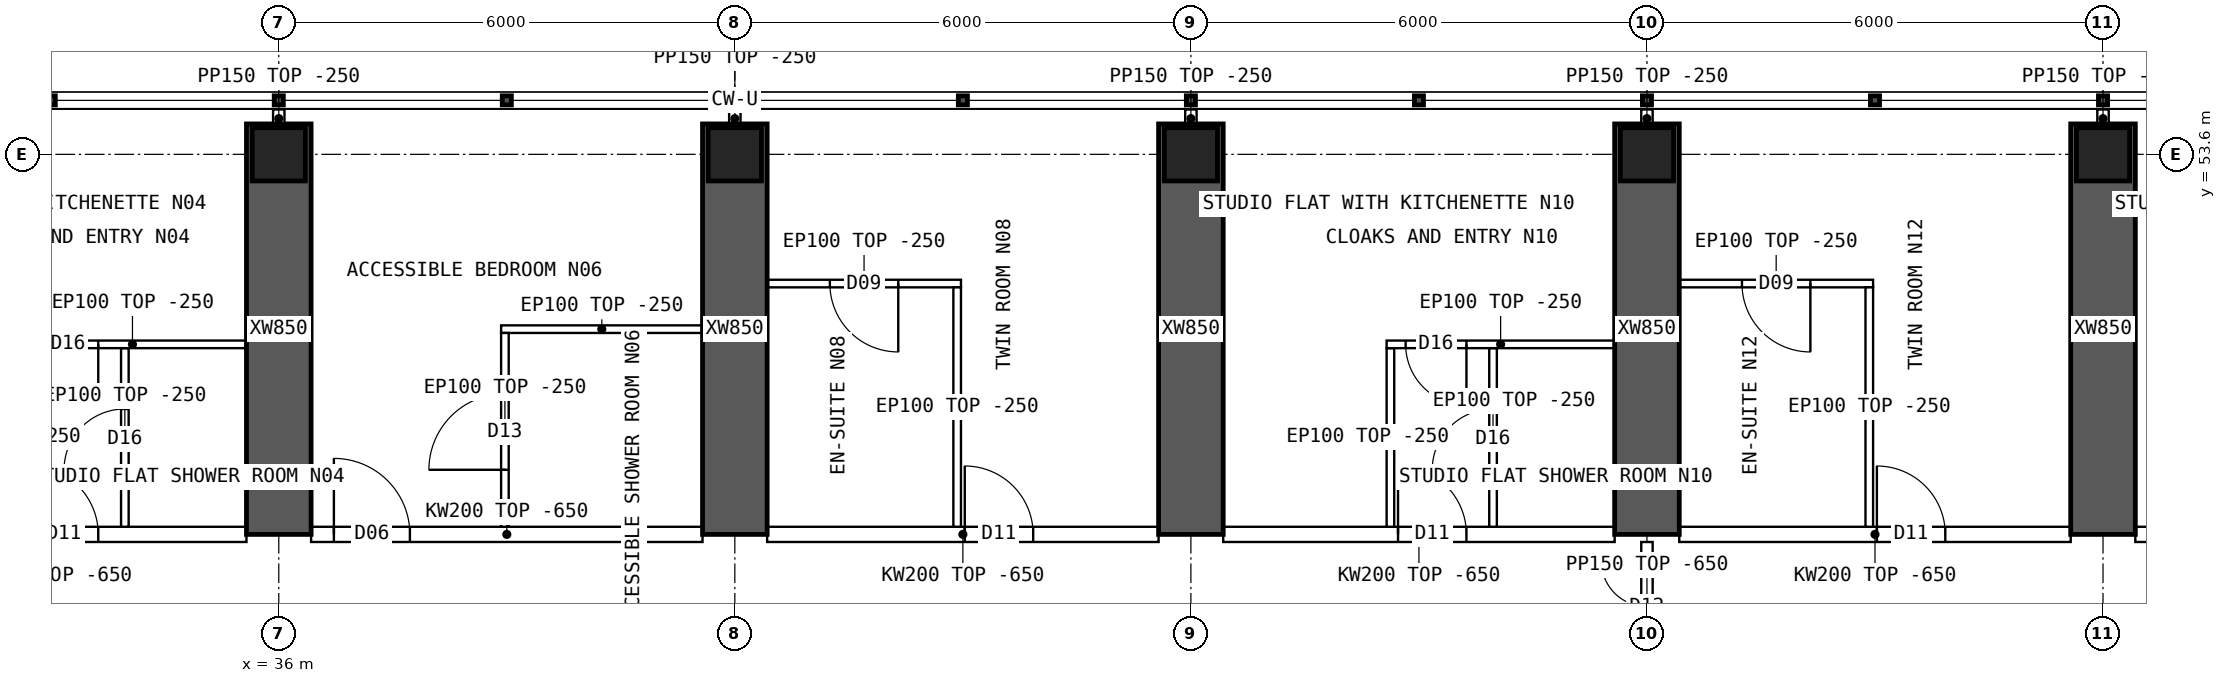
"""IFC4 building model, lengths in metres.
Left out: names, types, materials, properties, quantities, classifications, styles, units other than length and angle.
Written with IfcOpenShell. Run it as: python <this file> out.ifc"""

import sys

from ifc_helpers import new_model, si_unit, direction, frame, frame_2d, origin, origin_2d, place, context, subcontext, project, spatial, polyline, rectangle, hollow_rectangle, outline, extrude, element, fill, save


model = new_model("IFC4")
c1 = context("Model", 3, precision=1e-05, world=origin(), true_north=direction((0.0, 1.0)))
c2 = subcontext(c1, "Body", "Model", "MODEL_VIEW")
j1 = project(units=[si_unit("LENGTHUNIT", "METRE"), si_unit("PLANEANGLEUNIT", "RADIAN")], contexts=[c1])
p1 = place(None, origin())
s1 = spatial("IfcSite", under=j1, at=p1, CompositionType="ELEMENT")
p2 = place(p1, origin())
s2 = spatial("IfcBuilding", under=s1, at=p2, CompositionType="ELEMENT")
p3 = place(p2, frame((0.0, 0.0, 186.1)))
s3 = spatial("IfcBuildingStorey", under=s2, at=p3, CompositionType="ELEMENT", Elevation=186.1)
for number, where, z_axis, x_axis in (
    (1, (36.0, 53.6, 0.0), (0.0, 0.0, 1.0), (1.0, 0.0, 0.0)),
    (2, (42.0, 53.6, 0.0), (0.0, 0.0, 1.0), (1.0, 0.0, 0.0)),
    (3, (48.0, 53.6, 0.0), (0.0, 0.0, 1.0), (1.0, 0.0, 0.0)),
    (4, (54.0, 53.6, 0.0), (0.0, 0.0, 1.0), (1.0, 0.0, 0.0)),
    (5, (60.0, 53.6, 0.0), (0.0, 0.0, 1.0), (1.0, 0.0, 0.0)),
):
    element("IfcColumn", number, at=place(p3, frame(where, z_axis=z_axis, x_axis=x_axis)), inside=s3, PredefinedType="COLUMN", context=c2, shape_type="SweptSolid", body=[
        extrude(hollow_rectangle(XDim=0.7, YDim=0.7, WallThickness=0.07, at=origin_2d()), origin(), (0.0, 0.0, 1.0), 3.75),
    ])
for number, where, z_axis, x_axis in (
    (6, (36.0, 48.6, 0.0), (0.0, 0.0, 1.0), (0.0, 1.0, 0.0)),
    (7, (42.0, 48.6, 0.0), (0.0, 0.0, 1.0), (0.0, 1.0, 0.0)),
    (8, (48.0, 48.6, 0.0), (0.0, 0.0, 1.0), (0.0, 1.0, 0.0)),
    (9, (54.0, 48.6, 0.0), (0.0, 0.0, 1.0), (0.0, 1.0, 0.0)),
    (10, (60.0, 48.6, 0.0), (0.0, 0.0, 1.0), (0.0, 1.0, 0.0)),
):
    element("IfcWall", number, at=place(p3, frame(where, z_axis=z_axis, x_axis=x_axis)), inside=s3, PredefinedType="SHEAR", context=c2, shape_type="SweptSolid", body=[
        extrude(rectangle(XDim=5.4, YDim=0.85, at=frame_2d((2.7, 0.0))), origin(), (0.0, 0.0, 1.0), 3.75),
    ])
p4 = place(p3, frame((30.425, 48.6, 0.0), z_axis=(0.0, 0.0, 1.0), x_axis=(1.0, 0.0, 0.0)))
e11 = element("IfcWall", 11, at=p4, inside=s3, PredefinedType="SOLIDWALL", context=c2, shape_type="SweptSolid", body=[
    extrude(outline(polyline([(0.0, 0.0), (5.15, 0.0), (5.15, 3.1), (0.0, 3.1), (0.0, 0.0)])), frame((0.0, 0.1, 0.0), z_axis=(0.0, -1.0, 0.0), x_axis=(1.0, 0.0, 0.0)), (0.0, 0.0, 1.0), 0.2),
])
p5 = place(p4, frame((2.3, 0.0, 0.0)))
e12 = element("IfcOpeningElement", 12, at=p5, cuts=e11, PredefinedType="OPENING", context=c2, shape_type="SweptSolid", body=[
    extrude(rectangle(XDim=0.9, YDim=2.1, at=frame_2d((0.45, 1.05))), frame((0.0, 0.11, 0.0), z_axis=(0.0, -1.0, 0.0), x_axis=(1.0, 0.0, 0.0)), (0.0, 0.0, 1.0), 0.22),
])
p6 = place(p3, frame((36.425, 48.6, 0.0), z_axis=(0.0, 0.0, 1.0), x_axis=(1.0, 0.0, 0.0)))
e13 = element("IfcWall", 13, at=p6, inside=s3, PredefinedType="SOLIDWALL", context=c2, shape_type="SweptSolid", body=[
    extrude(outline(polyline([(0.0, 0.0), (5.15, 0.0), (5.15, 3.1), (0.0, 3.1), (0.0, 0.0)])), frame((0.0, 0.1, 0.0), z_axis=(0.0, -1.0, 0.0), x_axis=(1.0, 0.0, 0.0)), (0.0, 0.0, 1.0), 0.2),
])
p7 = place(p6, frame((0.3, 0.0, 0.0)))
e14 = element("IfcOpeningElement", 14, at=p7, cuts=e13, PredefinedType="OPENING", context=c2, shape_type="SweptSolid", body=[
    extrude(rectangle(XDim=1.0, YDim=2.1, at=frame_2d((0.5, 1.05))), frame((0.0, 0.11, 0.0), z_axis=(0.0, -1.0, 0.0), x_axis=(1.0, 0.0, 0.0)), (0.0, 0.0, 1.0), 0.22),
])
p8 = place(p3, frame((42.425, 48.6, 0.0), z_axis=(0.0, 0.0, 1.0), x_axis=(1.0, 0.0, 0.0)))
e15 = element("IfcWall", 15, at=p8, inside=s3, PredefinedType="SOLIDWALL", context=c2, shape_type="SweptSolid", body=[
    extrude(outline(polyline([(0.0, 0.0), (5.15, 0.0), (5.15, 3.1), (0.0, 3.1), (0.0, 0.0)])), frame((0.0, 0.1, 0.0), z_axis=(0.0, -1.0, 0.0), x_axis=(1.0, 0.0, 0.0)), (0.0, 0.0, 1.0), 0.2),
])
p9 = place(p8, frame((2.6, 0.0, 0.0)))
e16 = element("IfcOpeningElement", 16, at=p9, cuts=e15, PredefinedType="OPENING", context=c2, shape_type="SweptSolid", body=[
    extrude(rectangle(XDim=0.9, YDim=2.1, at=frame_2d((0.45, 1.05))), frame((0.0, 0.11, 0.0), z_axis=(0.0, -1.0, 0.0), x_axis=(1.0, 0.0, 0.0)), (0.0, 0.0, 1.0), 0.22),
])
p10 = place(p3, frame((48.425, 48.6, 0.0), z_axis=(0.0, 0.0, 1.0), x_axis=(1.0, 0.0, 0.0)))
e17 = element("IfcWall", 17, at=p10, inside=s3, PredefinedType="SOLIDWALL", context=c2, shape_type="SweptSolid", body=[
    extrude(outline(polyline([(0.0, 0.0), (5.15, 0.0), (5.15, 3.1), (0.0, 3.1), (0.0, 0.0)])), frame((0.0, 0.1, 0.0), z_axis=(0.0, -1.0, 0.0), x_axis=(1.0, 0.0, 0.0)), (0.0, 0.0, 1.0), 0.2),
])
p11 = place(p10, frame((2.3, 0.0, 0.0)))
e18 = element("IfcOpeningElement", 18, at=p11, cuts=e17, PredefinedType="OPENING", context=c2, shape_type="SweptSolid", body=[
    extrude(rectangle(XDim=0.9, YDim=2.1, at=frame_2d((0.45, 1.05))), frame((0.0, 0.11, 0.0), z_axis=(0.0, -1.0, 0.0), x_axis=(1.0, 0.0, 0.0)), (0.0, 0.0, 1.0), 0.22),
])
p12 = place(p3, frame((54.425, 48.6, 0.0), z_axis=(0.0, 0.0, 1.0), x_axis=(1.0, 0.0, 0.0)))
e19 = element("IfcWall", 19, at=p12, inside=s3, PredefinedType="SOLIDWALL", context=c2, shape_type="SweptSolid", body=[
    extrude(outline(polyline([(0.0, 0.0), (5.15, 0.0), (5.15, 3.1), (0.0, 3.1), (0.0, 0.0)])), frame((0.0, 0.1, 0.0), z_axis=(0.0, -1.0, 0.0), x_axis=(1.0, 0.0, 0.0)), (0.0, 0.0, 1.0), 0.2),
])
p13 = place(p12, frame((2.6, 0.0, 0.0)))
e20 = element("IfcOpeningElement", 20, at=p13, cuts=e19, PredefinedType="OPENING", context=c2, shape_type="SweptSolid", body=[
    extrude(rectangle(XDim=0.9, YDim=2.1, at=frame_2d((0.45, 1.05))), frame((0.0, 0.11, 0.0), z_axis=(0.0, -1.0, 0.0), x_axis=(1.0, 0.0, 0.0)), (0.0, 0.0, 1.0), 0.22),
])
p14 = place(p3, frame((60.425, 48.6, 0.0), z_axis=(0.0, 0.0, 1.0), x_axis=(1.0, 0.0, 0.0)))
e21 = element("IfcWall", 21, at=p14, inside=s3, PredefinedType="SOLIDWALL", context=c2, shape_type="SweptSolid", body=[
    extrude(outline(polyline([(0.0, 0.0), (5.15, 0.0), (5.15, 3.1), (0.0, 3.1), (0.0, 0.0)])), frame((0.0, 0.1, 0.0), z_axis=(0.0, -1.0, 0.0), x_axis=(1.0, 0.0, 0.0)), (0.0, 0.0, 1.0), 0.2),
])
p15 = place(p14, frame((2.3, 0.0, 0.0)))
e22 = element("IfcOpeningElement", 22, at=p15, cuts=e21, PredefinedType="OPENING", context=c2, shape_type="SweptSolid", body=[
    extrude(rectangle(XDim=0.9, YDim=2.1, at=frame_2d((0.45, 1.05))), frame((0.0, 0.11, 0.0), z_axis=(0.0, -1.0, 0.0), x_axis=(1.0, 0.0, 0.0)), (0.0, 0.0, 1.0), 0.22),
])
p16 = place(p3, frame((32.575, 51.1, 0.0), z_axis=(0.0, 0.0, 1.0), x_axis=(1.0, 0.0, 0.0)))
e23 = element("IfcWall", 23, at=p16, inside=s3, PredefinedType="PARTITIONING", context=c2, shape_type="SweptSolid", body=[
    extrude(rectangle(XDim=3.0, YDim=0.1, at=frame_2d((1.5, 0.0))), origin(), (0.0, 0.0, 1.0), 3.5),
])
p17 = place(p16, frame((0.25, 0.0, 0.0)))
e24 = element("IfcOpeningElement", 24, at=p17, cuts=e23, PredefinedType="OPENING", context=c2, shape_type="SweptSolid", body=[
    extrude(rectangle(XDim=0.8, YDim=2.1, at=frame_2d((0.4, 1.05))), frame((0.0, 0.06, 0.0), z_axis=(0.0, -1.0, 0.0), x_axis=(1.0, 0.0, 0.0)), (0.0, 0.0, 1.0), 0.12),
])
p18 = place(p3, frame((33.975, 51.05, 0.0), z_axis=(0.0, 0.0, 1.0), x_axis=(0.0, -1.0, 0.0)))
e25 = element("IfcWall", 25, at=p18, inside=s3, PredefinedType="PARTITIONING", context=c2, shape_type="SweptSolid", body=[
    extrude(outline(polyline([(0.0, 0.0), (2.35, 0.0), (2.35, 3.1), (2.302, 3.1), (2.3, 3.5), (0.0, 3.5), (0.0, 0.0)])), frame((0.0, 0.05, 0.0), z_axis=(0.0, -1.0, 0.0), x_axis=(1.0, 0.0, 0.0)), (0.0, 0.0, 1.0), 0.1),
])
p19 = place(p18, frame((0.8, 0.0, 0.0)))
e26 = element("IfcOpeningElement", 26, at=p19, cuts=e25, PredefinedType="OPENING", context=c2, shape_type="SweptSolid", body=[
    extrude(rectangle(XDim=0.8, YDim=2.1, at=frame_2d((0.4, 1.05))), frame((0.0, 0.06, 0.0), z_axis=(0.0, -1.0, 0.0), x_axis=(1.0, 0.0, 0.0)), (0.0, 0.0, 1.0), 0.12),
])
p20 = place(p3, frame((38.925, 51.3, 0.0), z_axis=(0.0, 0.0, 1.0), x_axis=(1.0, 0.0, 0.0)))
e27 = element("IfcWall", 27, at=p20, inside=s3, PredefinedType="PARTITIONING", context=c2, shape_type="SweptSolid", body=[
    extrude(rectangle(XDim=2.65, YDim=0.1, at=frame_2d((1.325, 0.0))), origin(), (0.0, 0.0, 1.0), 3.5),
])
p21 = place(p3, frame((38.975, 51.25, 0.0), z_axis=(0.0, 0.0, 1.0), x_axis=(0.0, -1.0, 0.0)))
e28 = element("IfcWall", 28, at=p21, inside=s3, PredefinedType="PARTITIONING", context=c2, shape_type="SweptSolid", body=[
    extrude(outline(polyline([(0.0, 0.0), (2.55, 0.0), (2.55, 3.1), (2.502, 3.1), (2.5, 3.5), (0.0, 3.5), (0.0, 0.0)])), frame((0.0, 0.05, 0.0), z_axis=(0.0, -1.0, 0.0), x_axis=(1.0, 0.0, 0.0)), (0.0, 0.0, 1.0), 0.1),
])
p22 = place(p21, frame((0.8, 0.0, 0.0)))
e29 = element("IfcOpeningElement", 29, at=p22, cuts=e28, PredefinedType="OPENING", context=c2, shape_type="SweptSolid", body=[
    extrude(rectangle(XDim=1.0, YDim=2.1, at=frame_2d((0.5, 1.05))), frame((0.0, 0.06, 0.0), z_axis=(0.0, -1.0, 0.0), x_axis=(1.0, 0.0, 0.0)), (0.0, 0.0, 1.0), 0.12),
])
p23 = place(p3, frame((42.425, 51.9, 0.0), z_axis=(0.0, 0.0, 1.0), x_axis=(1.0, 0.0, 0.0)))
e30 = element("IfcWall", 30, at=p23, inside=s3, PredefinedType="PARTITIONING", context=c2, shape_type="SweptSolid", body=[
    extrude(rectangle(XDim=2.55, YDim=0.1, at=frame_2d((1.275, 0.0))), origin(), (0.0, 0.0, 1.0), 3.5),
])
p24 = place(p23, frame((0.825, 0.0, 0.0)))
e31 = element("IfcOpeningElement", 31, at=p24, cuts=e30, PredefinedType="OPENING", context=c2, shape_type="SweptSolid", body=[
    extrude(rectangle(XDim=0.9, YDim=2.1, at=frame_2d((0.45, 1.05))), frame((0.0, 0.06, 0.0), z_axis=(0.0, -1.0, 0.0), x_axis=(1.0, 0.0, 0.0)), (0.0, 0.0, 1.0), 0.12),
])
p25 = place(p3, frame((44.925, 51.85, 0.0), z_axis=(0.0, 0.0, 1.0), x_axis=(0.0, -1.0, 0.0)))
e32 = element("IfcWall", 32, at=p25, inside=s3, PredefinedType="PARTITIONING", context=c2, shape_type="SweptSolid", body=[
    extrude(outline(polyline([(0.0, 0.0), (3.15, 0.0), (3.15, 3.1), (3.102, 3.1), (3.1, 3.5), (0.0, 3.5), (0.0, 0.0)])), frame((0.0, 0.05, 0.0), z_axis=(0.0, -1.0, 0.0), x_axis=(1.0, 0.0, 0.0)), (0.0, 0.0, 1.0), 0.1),
])
p26 = place(p3, frame((50.575, 51.1, 0.0), z_axis=(0.0, 0.0, 1.0), x_axis=(1.0, 0.0, 0.0)))
e33 = element("IfcWall", 33, at=p26, inside=s3, PredefinedType="PARTITIONING", context=c2, shape_type="SweptSolid", body=[
    extrude(rectangle(XDim=3.0, YDim=0.1, at=frame_2d((1.5, 0.0))), origin(), (0.0, 0.0, 1.0), 3.5),
])
p27 = place(p26, frame((0.25, 0.0, 0.0)))
e34 = element("IfcOpeningElement", 34, at=p27, cuts=e33, PredefinedType="OPENING", context=c2, shape_type="SweptSolid", body=[
    extrude(rectangle(XDim=0.8, YDim=2.1, at=frame_2d((0.4, 1.05))), frame((0.0, 0.06, 0.0), z_axis=(0.0, -1.0, 0.0), x_axis=(1.0, 0.0, 0.0)), (0.0, 0.0, 1.0), 0.12),
])
p28 = place(p3, frame((50.625, 51.05, 0.0), z_axis=(0.0, 0.0, 1.0), x_axis=(0.0, -1.0, 0.0)))
e35 = element("IfcWall", 35, at=p28, inside=s3, PredefinedType="PARTITIONING", context=c2, shape_type="SweptSolid", body=[
    extrude(outline(polyline([(0.0, 0.0), (2.35, 0.0), (2.35, 3.1), (2.302, 3.1), (2.3, 3.5), (0.0, 3.5), (0.0, 0.0)])), frame((0.0, 0.05, 0.0), z_axis=(0.0, -1.0, 0.0), x_axis=(1.0, 0.0, 0.0)), (0.0, 0.0, 1.0), 0.1),
])
p29 = place(p3, frame((51.975, 51.05, 0.0), z_axis=(0.0, 0.0, 1.0), x_axis=(0.0, -1.0, 0.0)))
e36 = element("IfcWall", 36, at=p29, inside=s3, PredefinedType="PARTITIONING", context=c2, shape_type="SweptSolid", body=[
    extrude(outline(polyline([(0.0, 0.0), (2.35, 0.0), (2.35, 3.1), (2.302, 3.1), (2.3, 3.5), (0.0, 3.5), (0.0, 0.0)])), frame((0.0, 0.05, 0.0), z_axis=(0.0, -1.0, 0.0), x_axis=(1.0, 0.0, 0.0)), (0.0, 0.0, 1.0), 0.1),
])
p30 = place(p29, frame((0.8, 0.0, 0.0)))
e37 = element("IfcOpeningElement", 37, at=p30, cuts=e36, PredefinedType="OPENING", context=c2, shape_type="SweptSolid", body=[
    extrude(rectangle(XDim=0.8, YDim=2.1, at=frame_2d((0.4, 1.05))), frame((0.0, 0.06, 0.0), z_axis=(0.0, -1.0, 0.0), x_axis=(1.0, 0.0, 0.0)), (0.0, 0.0, 1.0), 0.12),
])
p31 = place(p3, frame((54.425, 51.9, 0.0), z_axis=(0.0, 0.0, 1.0), x_axis=(1.0, 0.0, 0.0)))
e38 = element("IfcWall", 38, at=p31, inside=s3, PredefinedType="PARTITIONING", context=c2, shape_type="SweptSolid", body=[
    extrude(rectangle(XDim=2.55, YDim=0.1, at=frame_2d((1.275, 0.0))), origin(), (0.0, 0.0, 1.0), 3.5),
])
p32 = place(p31, frame((0.825, 0.0, 0.0)))
e39 = element("IfcOpeningElement", 39, at=p32, cuts=e38, PredefinedType="OPENING", context=c2, shape_type="SweptSolid", body=[
    extrude(rectangle(XDim=0.9, YDim=2.1, at=frame_2d((0.45, 1.05))), frame((0.0, 0.06, 0.0), z_axis=(0.0, -1.0, 0.0), x_axis=(1.0, 0.0, 0.0)), (0.0, 0.0, 1.0), 0.12),
])
p33 = place(p3, frame((56.925, 51.85, 0.0), z_axis=(0.0, 0.0, 1.0), x_axis=(0.0, -1.0, 0.0)))
e40 = element("IfcWall", 40, at=p33, inside=s3, PredefinedType="PARTITIONING", context=c2, shape_type="SweptSolid", body=[
    extrude(outline(polyline([(0.0, 0.0), (3.15, 0.0), (3.15, 3.1), (3.102, 3.1), (3.1, 3.5), (0.0, 3.5), (0.0, 0.0)])), frame((0.0, 0.05, 0.0), z_axis=(0.0, -1.0, 0.0), x_axis=(1.0, 0.0, 0.0)), (0.0, 0.0, 1.0), 0.1),
])
p34 = place(p3, frame((54.0, 46.8, 0.0), z_axis=(0.0, 0.0, 1.0), x_axis=(0.0, 1.0, 0.0)))
e41 = element("IfcWall", 41, at=p34, inside=s3, PredefinedType="PARTITIONING", context=c2, shape_type="SweptSolid", body=[
    extrude(outline(polyline([(0.0, 0.0), (1.7, 0.0), (1.7, 3.1), (0.0, 3.1), (0.0, 0.0)])), frame((0.0, 0.075, 0.0), z_axis=(0.0, -1.0, 0.0), x_axis=(1.0, 0.0, 0.0)), (0.0, 0.0, 1.0), 0.15),
])
p35 = place(p34, frame((0.25, 0.0, 0.0)))
e42 = element("IfcOpeningElement", 42, at=p35, cuts=e41, PredefinedType="OPENING", context=c2, shape_type="SweptSolid", body=[
    extrude(rectangle(XDim=1.2, YDim=2.1, at=frame_2d((0.6, 1.05))), frame((0.0, 0.085, 0.0), z_axis=(0.0, -1.0, 0.0), x_axis=(1.0, 0.0, 0.0)), (0.0, 0.0, 1.0), 0.17),
])
for number, where, z_axis, x_axis in (
    (43, (36.0, 53.95, 0.0), (0.0, 0.0, 1.0), (0.0, 1.0, 0.0)),
    (44, (42.0, 53.95, 0.0), (0.0, 0.0, 1.0), (0.0, 1.0, 0.0)),
    (45, (48.0, 53.95, 0.0), (0.0, 0.0, 1.0), (0.0, 1.0, 0.0)),
    (46, (54.0, 53.95, 0.0), (0.0, 0.0, 1.0), (0.0, 1.0, 0.0)),
    (47, (60.0, 53.95, 0.0), (0.0, 0.0, 1.0), (0.0, 1.0, 0.0)),
):
    element("IfcWall", number, at=place(p3, frame(where, z_axis=z_axis, x_axis=x_axis)), inside=s3, PredefinedType="PARTITIONING", context=c2, shape_type="SweptSolid", body=[
        extrude(rectangle(XDim=0.24, YDim=0.15, at=frame_2d((0.12, 0.0))), origin(), (0.0, 0.0, 1.0), 3.5),
    ])
p36 = place(p17, origin())
e48 = element("IfcDoor", 48, at=p36, inside=s3, OperationType="SINGLE_SWING_RIGHT", PredefinedType="DOOR", context=c2, shape_type="SweptSolid", body=[
    extrude(rectangle(XDim=0.8, YDim=2.1, at=frame_2d((0.4, 1.05))), frame((0.0, 0.025, 0.0), z_axis=(0.0, -1.0, 0.0), x_axis=(1.0, 0.0, 0.0)), (0.0, 0.0, 1.0), 0.05),
])
fill(e24, e48)
p37 = place(p19, origin())
e49 = element("IfcDoor", 49, at=p37, inside=s3, OperationType="SINGLE_SWING_RIGHT", PredefinedType="DOOR", context=c2, shape_type="SweptSolid", body=[
    extrude(rectangle(XDim=0.8, YDim=2.1, at=frame_2d((0.4, 1.05))), frame((0.0, 0.025, 0.0), z_axis=(0.0, -1.0, 0.0), x_axis=(1.0, 0.0, 0.0)), (0.0, 0.0, 1.0), 0.05),
])
fill(e26, e49)
p38 = place(p5, origin())
e50 = element("IfcDoor", 50, at=p38, inside=s3, OperationType="SINGLE_SWING_LEFT", PredefinedType="DOOR", context=c2, shape_type="SweptSolid", body=[
    extrude(rectangle(XDim=0.9, YDim=2.1, at=frame_2d((0.45, 1.05))), frame((0.0, 0.025, 0.0), z_axis=(0.0, -1.0, 0.0), x_axis=(1.0, 0.0, 0.0)), (0.0, 0.0, 1.0), 0.05),
])
fill(e12, e50)
p39 = place(p22, origin())
e51 = element("IfcDoor", 51, at=p39, inside=s3, OperationType="SINGLE_SWING_RIGHT", PredefinedType="DOOR", context=c2, shape_type="SweptSolid", body=[
    extrude(rectangle(XDim=1.0, YDim=2.1, at=frame_2d((0.5, 1.05))), frame((0.0, 0.025, 0.0), z_axis=(0.0, -1.0, 0.0), x_axis=(1.0, 0.0, 0.0)), (0.0, 0.0, 1.0), 0.05),
])
fill(e29, e51)
p40 = place(p7, origin())
e52 = element("IfcDoor", 52, at=p40, inside=s3, OperationType="SINGLE_SWING_LEFT", PredefinedType="DOOR", context=c2, shape_type="SweptSolid", body=[
    extrude(rectangle(XDim=1.0, YDim=2.1, at=frame_2d((0.5, 1.05))), frame((0.0, 0.025, 0.0), z_axis=(0.0, -1.0, 0.0), x_axis=(1.0, 0.0, 0.0)), (0.0, 0.0, 1.0), 0.05),
])
fill(e14, e52)
p41 = place(p24, origin())
e53 = element("IfcDoor", 53, at=p41, inside=s3, OperationType="SINGLE_SWING_RIGHT", PredefinedType="DOOR", context=c2, shape_type="SweptSolid", body=[
    extrude(rectangle(XDim=0.9, YDim=2.1, at=frame_2d((0.45, 1.05))), frame((0.0, 0.025, 0.0), z_axis=(0.0, -1.0, 0.0), x_axis=(1.0, 0.0, 0.0)), (0.0, 0.0, 1.0), 0.05),
])
fill(e31, e53)
p42 = place(p9, origin())
e54 = element("IfcDoor", 54, at=p42, inside=s3, OperationType="SINGLE_SWING_LEFT", PredefinedType="DOOR", context=c2, shape_type="SweptSolid", body=[
    extrude(rectangle(XDim=0.9, YDim=2.1, at=frame_2d((0.45, 1.05))), frame((0.0, 0.025, 0.0), z_axis=(0.0, -1.0, 0.0), x_axis=(1.0, 0.0, 0.0)), (0.0, 0.0, 1.0), 0.05),
])
fill(e16, e54)
p43 = place(p27, origin())
e55 = element("IfcDoor", 55, at=p43, inside=s3, OperationType="SINGLE_SWING_RIGHT", PredefinedType="DOOR", context=c2, shape_type="SweptSolid", body=[
    extrude(rectangle(XDim=0.8, YDim=2.1, at=frame_2d((0.4, 1.05))), frame((0.0, 0.025, 0.0), z_axis=(0.0, -1.0, 0.0), x_axis=(1.0, 0.0, 0.0)), (0.0, 0.0, 1.0), 0.05),
])
fill(e34, e55)
p44 = place(p30, origin())
e56 = element("IfcDoor", 56, at=p44, inside=s3, OperationType="SINGLE_SWING_RIGHT", PredefinedType="DOOR", context=c2, shape_type="SweptSolid", body=[
    extrude(rectangle(XDim=0.8, YDim=2.1, at=frame_2d((0.4, 1.05))), frame((0.0, 0.025, 0.0), z_axis=(0.0, -1.0, 0.0), x_axis=(1.0, 0.0, 0.0)), (0.0, 0.0, 1.0), 0.05),
])
fill(e37, e56)
p45 = place(p11, origin())
e57 = element("IfcDoor", 57, at=p45, inside=s3, OperationType="SINGLE_SWING_LEFT", PredefinedType="DOOR", context=c2, shape_type="SweptSolid", body=[
    extrude(rectangle(XDim=0.9, YDim=2.1, at=frame_2d((0.45, 1.05))), frame((0.0, 0.025, 0.0), z_axis=(0.0, -1.0, 0.0), x_axis=(1.0, 0.0, 0.0)), (0.0, 0.0, 1.0), 0.05),
])
fill(e18, e57)
p46 = place(p32, origin())
e58 = element("IfcDoor", 58, at=p46, inside=s3, OperationType="SINGLE_SWING_RIGHT", PredefinedType="DOOR", context=c2, shape_type="SweptSolid", body=[
    extrude(rectangle(XDim=0.9, YDim=2.1, at=frame_2d((0.45, 1.05))), frame((0.0, 0.025, 0.0), z_axis=(0.0, -1.0, 0.0), x_axis=(1.0, 0.0, 0.0)), (0.0, 0.0, 1.0), 0.05),
])
fill(e39, e58)
p47 = place(p13, origin())
e59 = element("IfcDoor", 59, at=p47, inside=s3, OperationType="SINGLE_SWING_LEFT", PredefinedType="DOOR", context=c2, shape_type="SweptSolid", body=[
    extrude(rectangle(XDim=0.9, YDim=2.1, at=frame_2d((0.45, 1.05))), frame((0.0, 0.025, 0.0), z_axis=(0.0, -1.0, 0.0), x_axis=(1.0, 0.0, 0.0)), (0.0, 0.0, 1.0), 0.05),
])
fill(e20, e59)
p48 = place(p35, origin())
e60 = element("IfcDoor", 60, at=p48, inside=s3, OperationType="DOUBLE_DOOR_SINGLE_SWING", PredefinedType="DOOR", context=c2, shape_type="SweptSolid", body=[
    extrude(rectangle(XDim=1.2, YDim=2.1, at=frame_2d((0.6, 1.05))), frame((0.0, 0.025, 0.0), z_axis=(0.0, -1.0, 0.0), x_axis=(1.0, 0.0, 0.0)), (0.0, 0.0, 1.0), 0.05),
])
fill(e42, e60)
save(model, sys.argv[1])
